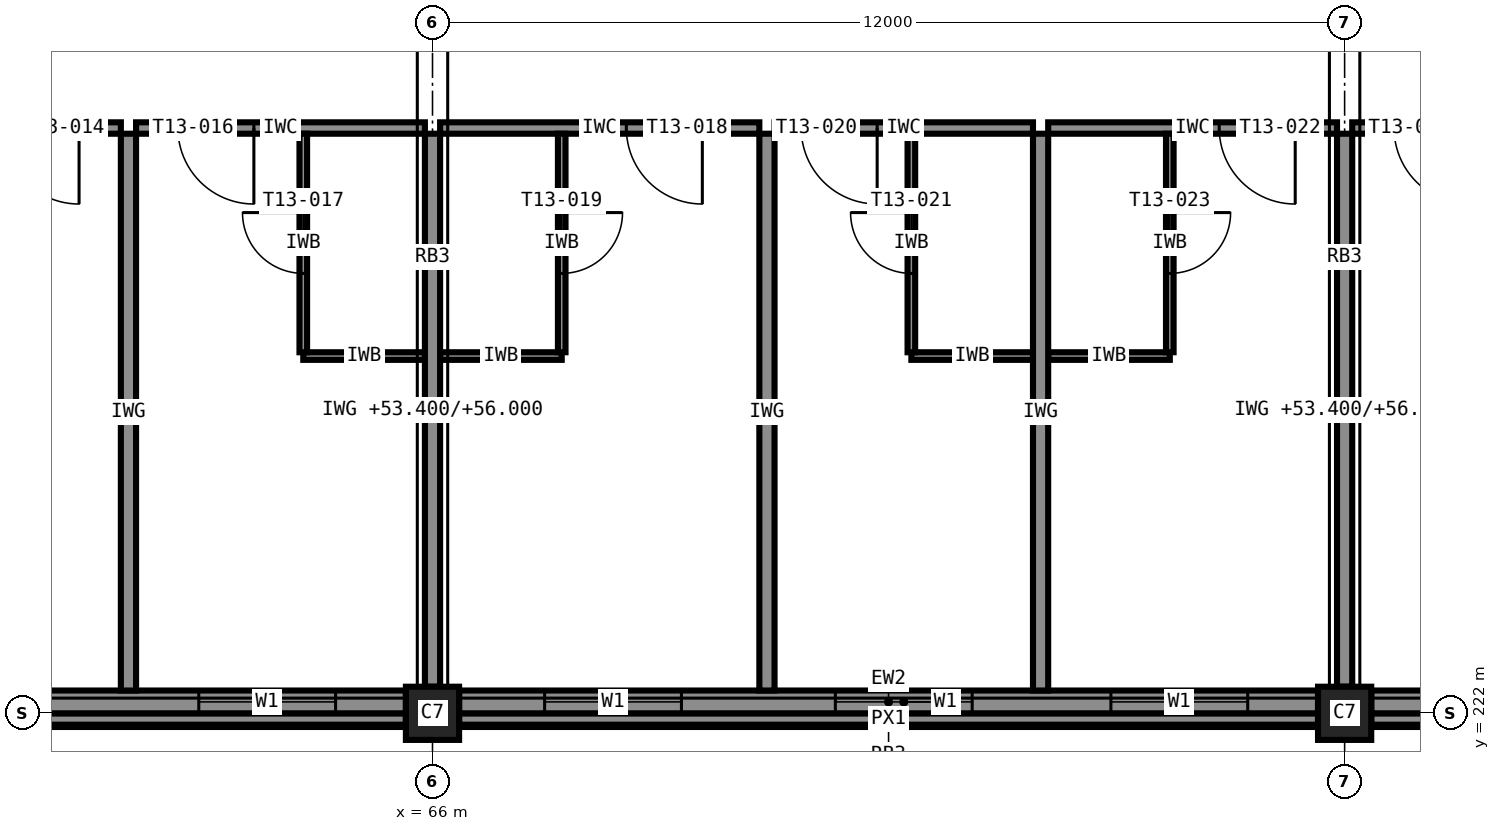
"""IFC4 building model, lengths in metres.
Left out: names, types, materials, properties, quantities, classifications, styles, units other than length and angle.
Written with IfcOpenShell. Run it as: python <this file> out.ifc"""

import sys

from ifc_helpers import new_model, si_unit, direction, frame, frame_2d, origin, origin_2d, place, context, subcontext, project, spatial, rectangle, extrude, element, fill, save


model = new_model("IFC4")
c1 = context("Model", 3, precision=1e-05, world=origin(), true_north=direction((0.0, 1.0)))
c2 = subcontext(c1, "Body", "Model", "MODEL_VIEW")
j1 = project(units=[si_unit("LENGTHUNIT", "METRE"), si_unit("PLANEANGLEUNIT", "RADIAN")], contexts=[c1])
p1 = place(None, origin())
s1 = spatial("IfcSite", under=j1, at=p1, CompositionType="ELEMENT")
p2 = place(p1, origin())
s2 = spatial("IfcBuilding", under=s1, at=p2, CompositionType="ELEMENT")
p3 = place(p2, frame((0.0, 0.0, 53.4)))
s3 = spatial("IfcBuildingStorey", under=s2, at=p3, CompositionType="ELEMENT", Elevation=53.4)
for number, where, z_axis, x_axis in (
    (1, (66.0, 222.0, 0.0), (0.0, 0.0, 1.0), (1.0, 0.0, 0.0)),
    (2, (78.0, 222.0, 0.0), (0.0, 0.0, 1.0), (1.0, 0.0, 0.0)),
):
    element("IfcColumn", number, at=place(p3, frame(where, z_axis=z_axis, x_axis=x_axis)), inside=s3, PredefinedType="COLUMN", context=c2, shape_type="SweptSolid", body=[
        extrude(rectangle(XDim=0.7, YDim=0.7, at=origin_2d()), origin(), (0.0, 0.0, 1.0), 3.6),
    ])
p4 = place(p3, frame((54.35, 222.15, 0.0), z_axis=(0.0, 0.0, 1.0), x_axis=(1.0, 0.0, 0.0)))
e3 = element("IfcWall", 3, at=p4, inside=s3, PredefinedType="STANDARD", context=c2, shape_type="SweptSolid", body=[
    extrude(rectangle(XDim=11.3, YDim=0.3, at=frame_2d((5.65, 0.0))), origin(), (0.0, 0.0, 1.0), 2.6),
])
p5 = place(p4, frame((0.925, 0.0, 0.85)))
e4 = element("IfcOpeningElement", 4, at=p5, cuts=e3, PredefinedType="OPENING", context=c2, shape_type="SweptSolid", body=[
    extrude(rectangle(XDim=1.8, YDim=1.75, at=frame_2d((0.9, 0.875))), frame((0.0, 0.16, 0.0), z_axis=(0.0, -1.0, 0.0), x_axis=(1.0, 0.0, 0.0)), (0.0, 0.0, 1.0), 0.32),
])
p6 = place(p4, frame((4.75, 0.0, 0.85)))
e5 = element("IfcOpeningElement", 5, at=p6, cuts=e3, PredefinedType="OPENING", context=c2, shape_type="SweptSolid", body=[
    extrude(rectangle(XDim=1.8, YDim=1.75, at=frame_2d((0.9, 0.875))), frame((0.0, 0.16, 0.0), z_axis=(0.0, -1.0, 0.0), x_axis=(1.0, 0.0, 0.0)), (0.0, 0.0, 1.0), 0.32),
])
p7 = place(p4, frame((8.575, 0.0, 0.85)))
e6 = element("IfcOpeningElement", 6, at=p7, cuts=e3, PredefinedType="OPENING", context=c2, shape_type="SweptSolid", body=[
    extrude(rectangle(XDim=1.8, YDim=1.75, at=frame_2d((0.9, 0.875))), frame((0.0, 0.16, 0.0), z_axis=(0.0, -1.0, 0.0), x_axis=(1.0, 0.0, 0.0)), (0.0, 0.0, 1.0), 0.32),
])
p8 = place(p3, frame((66.35, 222.15, 0.0), z_axis=(0.0, 0.0, 1.0), x_axis=(1.0, 0.0, 0.0)))
e7 = element("IfcWall", 7, at=p8, inside=s3, PredefinedType="STANDARD", context=c2, shape_type="SweptSolid", body=[
    extrude(rectangle(XDim=11.3, YDim=0.3, at=frame_2d((5.65, 0.0))), origin(), (0.0, 0.0, 1.0), 2.6),
])
p9 = place(p8, frame((1.125, 0.0, 0.85)))
e8 = element("IfcOpeningElement", 8, at=p9, cuts=e7, PredefinedType="OPENING", context=c2, shape_type="SweptSolid", body=[
    extrude(rectangle(XDim=1.8, YDim=1.75, at=frame_2d((0.9, 0.875))), frame((0.0, 0.16, 0.0), z_axis=(0.0, -1.0, 0.0), x_axis=(1.0, 0.0, 0.0)), (0.0, 0.0, 1.0), 0.32),
])
p10 = place(p8, frame((4.95, 0.0, 0.85)))
e9 = element("IfcOpeningElement", 9, at=p10, cuts=e7, PredefinedType="OPENING", context=c2, shape_type="SweptSolid", body=[
    extrude(rectangle(XDim=1.8, YDim=1.75, at=frame_2d((0.9, 0.875))), frame((0.0, 0.16, 0.0), z_axis=(0.0, -1.0, 0.0), x_axis=(1.0, 0.0, 0.0)), (0.0, 0.0, 1.0), 0.32),
])
p11 = place(p8, frame((8.575, 0.0, 0.85)))
e10 = element("IfcOpeningElement", 10, at=p11, cuts=e7, PredefinedType="OPENING", context=c2, shape_type="SweptSolid", body=[
    extrude(rectangle(XDim=1.8, YDim=1.75, at=frame_2d((0.9, 0.875))), frame((0.0, 0.16, 0.0), z_axis=(0.0, -1.0, 0.0), x_axis=(1.0, 0.0, 0.0)), (0.0, 0.0, 1.0), 0.32),
])
p12 = place(p3, frame((78.35, 222.15, 0.0), z_axis=(0.0, 0.0, 1.0), x_axis=(1.0, 0.0, 0.0)))
e11 = element("IfcWall", 11, at=p12, inside=s3, PredefinedType="STANDARD", context=c2, shape_type="SweptSolid", body=[
    extrude(rectangle(XDim=11.3, YDim=0.3, at=frame_2d((5.65, 0.0))), origin(), (0.0, 0.0, 1.0), 2.6),
])
p13 = place(p12, frame((0.925, 0.0, 0.85)))
e12 = element("IfcOpeningElement", 12, at=p13, cuts=e11, PredefinedType="OPENING", context=c2, shape_type="SweptSolid", body=[
    extrude(rectangle(XDim=1.8, YDim=1.75, at=frame_2d((0.9, 0.875))), frame((0.0, 0.16, 0.0), z_axis=(0.0, -1.0, 0.0), x_axis=(1.0, 0.0, 0.0)), (0.0, 0.0, 1.0), 0.32),
])
p14 = place(p12, frame((4.75, 0.0, 0.85)))
e13 = element("IfcOpeningElement", 13, at=p14, cuts=e11, PredefinedType="OPENING", context=c2, shape_type="SweptSolid", body=[
    extrude(rectangle(XDim=1.8, YDim=1.75, at=frame_2d((0.9, 0.875))), frame((0.0, 0.16, 0.0), z_axis=(0.0, -1.0, 0.0), x_axis=(1.0, 0.0, 0.0)), (0.0, 0.0, 1.0), 0.32),
])
for number, where, z_axis, x_axis in (
    (14, (54.35, 221.925, 3.4), (0.0, 0.0, 1.0), (1.0, 0.0, 0.0)),
    (15, (66.35, 221.925, 3.4), (0.0, 0.0, 1.0), (1.0, 0.0, 0.0)),
    (16, (78.35, 221.925, 3.4), (0.0, 0.0, 1.0), (1.0, 0.0, 0.0)),
):
    element("IfcWall", number, at=place(p3, frame(where, z_axis=z_axis, x_axis=x_axis)), inside=s3, PredefinedType="STANDARD", context=c2, shape_type="SweptSolid", body=[
        extrude(rectangle(XDim=11.3, YDim=0.15, at=frame_2d((5.65, 0.0))), origin(), (0.0, 0.0, 1.0), 0.2),
    ])
p15 = place(p3, frame((61.9, 229.7, 0.0), z_axis=(0.0, 0.0, 1.0), x_axis=(-1.0, 0.0, 0.0)))
e17 = element("IfcWall", 17, at=p15, inside=s3, PredefinedType="PARTITIONING", context=c2, shape_type="SweptSolid", body=[
    extrude(rectangle(XDim=3.8, YDim=0.15, at=frame_2d((1.9, 0.0))), origin(), (0.0, 0.0, 1.0), 3.4),
])
p16 = place(p15, frame((0.55, 0.0, 0.0)))
e18 = element("IfcOpeningElement", 18, at=p16, cuts=e17, PredefinedType="OPENING", context=c2, shape_type="SweptSolid", body=[
    extrude(rectangle(XDim=1.0, YDim=2.1, at=frame_2d((0.5, 1.05))), frame((0.0, 0.085, 0.0), z_axis=(0.0, -1.0, 0.0), x_axis=(1.0, 0.0, 0.0)), (0.0, 0.0, 1.0), 0.17),
])
p17 = place(p3, frame((65.9, 229.7, 0.0), z_axis=(0.0, 0.0, 1.0), x_axis=(-1.0, 0.0, 0.0)))
e19 = element("IfcWall", 19, at=p17, inside=s3, PredefinedType="PARTITIONING", context=c2, shape_type="SweptSolid", body=[
    extrude(rectangle(XDim=3.8, YDim=0.15, at=frame_2d((1.9, 0.0))), origin(), (0.0, 0.0, 1.0), 3.4),
])
p18 = place(p17, frame((2.25, 0.0, 0.0)))
e20 = element("IfcOpeningElement", 20, at=p18, cuts=e19, PredefinedType="OPENING", context=c2, shape_type="SweptSolid", body=[
    extrude(rectangle(XDim=1.0, YDim=2.1, at=frame_2d((0.5, 1.05))), frame((0.0, 0.085, 0.0), z_axis=(0.0, -1.0, 0.0), x_axis=(1.0, 0.0, 0.0)), (0.0, 0.0, 1.0), 0.17),
])
p19 = place(p3, frame((64.3, 226.7, 0.0), z_axis=(0.0, 0.0, 1.0), x_axis=(1.0, 0.0, 0.0)))
e21 = element("IfcWall", 21, at=p19, inside=s3, PredefinedType="PARTITIONING", context=c2, shape_type="SweptSolid", body=[
    extrude(rectangle(XDim=1.6, YDim=0.1, at=frame_2d((0.8, 0.0))), origin(), (0.0, 0.0, 1.0), 3.4),
])
p20 = place(p3, frame((64.3, 226.75, 0.0), z_axis=(0.0, 0.0, 1.0), x_axis=(0.0, 1.0, 0.0)))
e22 = element("IfcWall", 22, at=p20, inside=s3, PredefinedType="PARTITIONING", context=c2, shape_type="SweptSolid", body=[
    extrude(rectangle(XDim=2.875, YDim=0.1, at=frame_2d((1.438, 0.0))), origin(), (0.0, 0.0, 1.0), 3.4),
])
p21 = place(p20, frame((1.038, 0.0, 0.0)))
e23 = element("IfcOpeningElement", 23, at=p21, cuts=e22, PredefinedType="OPENING", context=c2, shape_type="SweptSolid", body=[
    extrude(rectangle(XDim=0.8, YDim=2.1, at=frame_2d((0.4, 1.05))), frame((0.0, 0.06, 0.0), z_axis=(0.0, -1.0, 0.0), x_axis=(1.0, 0.0, 0.0)), (0.0, 0.0, 1.0), 0.12),
])
p22 = place(p3, frame((70.3, 229.7, 0.0), z_axis=(0.0, 0.0, 1.0), x_axis=(-1.0, 0.0, 0.0)))
e24 = element("IfcWall", 24, at=p22, inside=s3, PredefinedType="PARTITIONING", context=c2, shape_type="SweptSolid", body=[
    extrude(rectangle(XDim=4.2, YDim=0.15, at=frame_2d((2.1, 0.0))), origin(), (0.0, 0.0, 1.0), 3.4),
])
p23 = place(p22, frame((0.75, 0.0, 0.0)))
e25 = element("IfcOpeningElement", 25, at=p23, cuts=e24, PredefinedType="OPENING", context=c2, shape_type="SweptSolid", body=[
    extrude(rectangle(XDim=1.0, YDim=2.1, at=frame_2d((0.5, 1.05))), frame((0.0, 0.085, 0.0), z_axis=(0.0, -1.0, 0.0), x_axis=(1.0, 0.0, 0.0)), (0.0, 0.0, 1.0), 0.17),
])
p24 = place(p3, frame((66.1, 226.7, 0.0), z_axis=(0.0, 0.0, 1.0), x_axis=(1.0, 0.0, 0.0)))
e26 = element("IfcWall", 26, at=p24, inside=s3, PredefinedType="PARTITIONING", context=c2, shape_type="SweptSolid", body=[
    extrude(rectangle(XDim=1.6, YDim=0.1, at=frame_2d((0.8, 0.0))), origin(), (0.0, 0.0, 1.0), 3.4),
])
p25 = place(p3, frame((67.7, 229.625, 0.0), z_axis=(0.0, 0.0, 1.0), x_axis=(0.0, -1.0, 0.0)))
e27 = element("IfcWall", 27, at=p25, inside=s3, PredefinedType="PARTITIONING", context=c2, shape_type="SweptSolid", body=[
    extrude(rectangle(XDim=2.875, YDim=0.1, at=frame_2d((1.438, 0.0))), origin(), (0.0, 0.0, 1.0), 3.4),
])
p26 = place(p25, frame((1.038, 0.0, 0.0)))
e28 = element("IfcOpeningElement", 28, at=p26, cuts=e27, PredefinedType="OPENING", context=c2, shape_type="SweptSolid", body=[
    extrude(rectangle(XDim=0.8, YDim=2.1, at=frame_2d((0.4, 1.05))), frame((0.0, 0.06, 0.0), z_axis=(0.0, -1.0, 0.0), x_axis=(1.0, 0.0, 0.0)), (0.0, 0.0, 1.0), 0.12),
])
p27 = place(p3, frame((73.9, 229.7, 0.0), z_axis=(0.0, 0.0, 1.0), x_axis=(-1.0, 0.0, 0.0)))
e29 = element("IfcWall", 29, at=p27, inside=s3, PredefinedType="PARTITIONING", context=c2, shape_type="SweptSolid", body=[
    extrude(rectangle(XDim=3.4, YDim=0.15, at=frame_2d((1.7, 0.0))), origin(), (0.0, 0.0, 1.0), 3.4),
])
p28 = place(p27, frame((2.05, 0.0, 0.0)))
e30 = element("IfcOpeningElement", 30, at=p28, cuts=e29, PredefinedType="OPENING", context=c2, shape_type="SweptSolid", body=[
    extrude(rectangle(XDim=1.0, YDim=2.1, at=frame_2d((0.5, 1.05))), frame((0.0, 0.085, 0.0), z_axis=(0.0, -1.0, 0.0), x_axis=(1.0, 0.0, 0.0)), (0.0, 0.0, 1.0), 0.17),
])
p29 = place(p3, frame((72.3, 226.7, 0.0), z_axis=(0.0, 0.0, 1.0), x_axis=(1.0, 0.0, 0.0)))
e31 = element("IfcWall", 31, at=p29, inside=s3, PredefinedType="PARTITIONING", context=c2, shape_type="SweptSolid", body=[
    extrude(rectangle(XDim=1.6, YDim=0.1, at=frame_2d((0.8, 0.0))), origin(), (0.0, 0.0, 1.0), 3.4),
])
p30 = place(p3, frame((72.3, 226.75, 0.0), z_axis=(0.0, 0.0, 1.0), x_axis=(0.0, 1.0, 0.0)))
e32 = element("IfcWall", 32, at=p30, inside=s3, PredefinedType="PARTITIONING", context=c2, shape_type="SweptSolid", body=[
    extrude(rectangle(XDim=2.875, YDim=0.1, at=frame_2d((1.438, 0.0))), origin(), (0.0, 0.0, 1.0), 3.4),
])
p31 = place(p30, frame((1.038, 0.0, 0.0)))
e33 = element("IfcOpeningElement", 33, at=p31, cuts=e32, PredefinedType="OPENING", context=c2, shape_type="SweptSolid", body=[
    extrude(rectangle(XDim=0.8, YDim=2.1, at=frame_2d((0.4, 1.05))), frame((0.0, 0.06, 0.0), z_axis=(0.0, -1.0, 0.0), x_axis=(1.0, 0.0, 0.0)), (0.0, 0.0, 1.0), 0.12),
])
p32 = place(p3, frame((77.9, 229.7, 0.0), z_axis=(0.0, 0.0, 1.0), x_axis=(-1.0, 0.0, 0.0)))
e34 = element("IfcWall", 34, at=p32, inside=s3, PredefinedType="PARTITIONING", context=c2, shape_type="SweptSolid", body=[
    extrude(rectangle(XDim=3.8, YDim=0.15, at=frame_2d((1.9, 0.0))), origin(), (0.0, 0.0, 1.0), 3.4),
])
p33 = place(p32, frame((0.55, 0.0, 0.0)))
e35 = element("IfcOpeningElement", 35, at=p33, cuts=e34, PredefinedType="OPENING", context=c2, shape_type="SweptSolid", body=[
    extrude(rectangle(XDim=1.0, YDim=2.1, at=frame_2d((0.5, 1.05))), frame((0.0, 0.085, 0.0), z_axis=(0.0, -1.0, 0.0), x_axis=(1.0, 0.0, 0.0)), (0.0, 0.0, 1.0), 0.17),
])
p34 = place(p3, frame((74.1, 226.7, 0.0), z_axis=(0.0, 0.0, 1.0), x_axis=(1.0, 0.0, 0.0)))
e36 = element("IfcWall", 36, at=p34, inside=s3, PredefinedType="PARTITIONING", context=c2, shape_type="SweptSolid", body=[
    extrude(rectangle(XDim=1.6, YDim=0.1, at=frame_2d((0.8, 0.0))), origin(), (0.0, 0.0, 1.0), 3.4),
])
p35 = place(p3, frame((75.7, 229.625, 0.0), z_axis=(0.0, 0.0, 1.0), x_axis=(0.0, -1.0, 0.0)))
e37 = element("IfcWall", 37, at=p35, inside=s3, PredefinedType="PARTITIONING", context=c2, shape_type="SweptSolid", body=[
    extrude(rectangle(XDim=2.875, YDim=0.1, at=frame_2d((1.438, 0.0))), origin(), (0.0, 0.0, 1.0), 3.4),
])
p36 = place(p35, frame((1.038, 0.0, 0.0)))
e38 = element("IfcOpeningElement", 38, at=p36, cuts=e37, PredefinedType="OPENING", context=c2, shape_type="SweptSolid", body=[
    extrude(rectangle(XDim=0.8, YDim=2.1, at=frame_2d((0.4, 1.05))), frame((0.0, 0.06, 0.0), z_axis=(0.0, -1.0, 0.0), x_axis=(1.0, 0.0, 0.0)), (0.0, 0.0, 1.0), 0.12),
])
p37 = place(p3, frame((81.9, 229.7, 0.0), z_axis=(0.0, 0.0, 1.0), x_axis=(-1.0, 0.0, 0.0)))
e39 = element("IfcWall", 39, at=p37, inside=s3, PredefinedType="PARTITIONING", context=c2, shape_type="SweptSolid", body=[
    extrude(rectangle(XDim=3.8, YDim=0.15, at=frame_2d((1.9, 0.0))), origin(), (0.0, 0.0, 1.0), 3.4),
])
p38 = place(p37, frame((2.25, 0.0, 0.0)))
e40 = element("IfcOpeningElement", 40, at=p38, cuts=e39, PredefinedType="OPENING", context=c2, shape_type="SweptSolid", body=[
    extrude(rectangle(XDim=1.0, YDim=2.1, at=frame_2d((0.5, 1.05))), frame((0.0, 0.085, 0.0), z_axis=(0.0, -1.0, 0.0), x_axis=(1.0, 0.0, 0.0)), (0.0, 0.0, 1.0), 0.17),
])
p39 = place(p3, frame((62.0, 222.3, 0.0), z_axis=(0.0, 0.0, 1.0), x_axis=(0.0, 1.0, 0.0)))
e41 = element("IfcWall", 41, at=p39, inside=s3, PredefinedType="PARTITIONING", context=c2, shape_type="SweptSolid", body=[
    extrude(rectangle(XDim=7.325, YDim=0.2, at=frame_2d((3.663, 0.0))), origin(), (0.0, 0.0, 1.0), 3.4),
])
p40 = place(p3, frame((66.0, 222.35, 0.0), z_axis=(0.0, 0.0, 1.0), x_axis=(0.0, 1.0, 0.0)))
e42 = element("IfcWall", 42, at=p40, inside=s3, PredefinedType="PARTITIONING", context=c2, shape_type="SweptSolid", body=[
    extrude(rectangle(XDim=7.275, YDim=0.2, at=frame_2d((3.637, 0.0))), origin(), (0.0, 0.0, 1.0), 2.6),
])
for number, where, z_axis, x_axis in (
    (43, (70.4, 222.3, 0.0), (0.0, 0.0, 1.0), (0.0, 1.0, 0.0)),
    (44, (74.0, 222.3, 0.0), (0.0, 0.0, 1.0), (0.0, 1.0, 0.0)),
):
    element("IfcWall", number, at=place(p3, frame(where, z_axis=z_axis, x_axis=x_axis)), inside=s3, PredefinedType="PARTITIONING", context=c2, shape_type="SweptSolid", body=[
        extrude(rectangle(XDim=7.325, YDim=0.2, at=frame_2d((3.663, 0.0))), origin(), (0.0, 0.0, 1.0), 3.4),
    ])
p41 = place(p3, frame((78.0, 222.35, 0.0), z_axis=(0.0, 0.0, 1.0), x_axis=(0.0, 1.0, 0.0)))
e45 = element("IfcWall", 45, at=p41, inside=s3, PredefinedType="PARTITIONING", context=c2, shape_type="SweptSolid", body=[
    extrude(rectangle(XDim=7.275, YDim=0.2, at=frame_2d((3.637, 0.0))), origin(), (0.0, 0.0, 1.0), 2.6),
])
p42 = place(p7, origin())
e46 = element("IfcWindow", 46, at=p42, inside=s3, PartitioningType="SINGLE_PANEL", PredefinedType="WINDOW", context=c2, shape_type="SweptSolid", body=[
    extrude(rectangle(XDim=1.8, YDim=1.75, at=frame_2d((0.9, 0.875))), frame((0.0, 0.03, 0.0), z_axis=(0.0, -1.0, 0.0), x_axis=(1.0, 0.0, 0.0)), (0.0, 0.0, 1.0), 0.06),
])
fill(e6, e46)
p43 = place(p9, origin())
e47 = element("IfcWindow", 47, at=p43, inside=s3, PartitioningType="SINGLE_PANEL", PredefinedType="WINDOW", context=c2, shape_type="SweptSolid", body=[
    extrude(rectangle(XDim=1.8, YDim=1.75, at=frame_2d((0.9, 0.875))), frame((0.0, 0.03, 0.0), z_axis=(0.0, -1.0, 0.0), x_axis=(1.0, 0.0, 0.0)), (0.0, 0.0, 1.0), 0.06),
])
fill(e8, e47)
p44 = place(p10, origin())
e48 = element("IfcWindow", 48, at=p44, inside=s3, PartitioningType="SINGLE_PANEL", PredefinedType="WINDOW", context=c2, shape_type="SweptSolid", body=[
    extrude(rectangle(XDim=1.8, YDim=1.75, at=frame_2d((0.9, 0.875))), frame((0.0, 0.03, 0.0), z_axis=(0.0, -1.0, 0.0), x_axis=(1.0, 0.0, 0.0)), (0.0, 0.0, 1.0), 0.06),
])
fill(e9, e48)
p45 = place(p11, origin())
e49 = element("IfcWindow", 49, at=p45, inside=s3, PartitioningType="SINGLE_PANEL", PredefinedType="WINDOW", context=c2, shape_type="SweptSolid", body=[
    extrude(rectangle(XDim=1.8, YDim=1.75, at=frame_2d((0.9, 0.875))), frame((0.0, 0.03, 0.0), z_axis=(0.0, -1.0, 0.0), x_axis=(1.0, 0.0, 0.0)), (0.0, 0.0, 1.0), 0.06),
])
fill(e10, e49)
p46 = place(p16, origin())
e50 = element("IfcDoor", 50, at=p46, inside=s3, OperationType="SINGLE_SWING_LEFT", PredefinedType="DOOR", context=c2, shape_type="SweptSolid", body=[
    extrude(rectangle(XDim=1.0, YDim=2.1, at=frame_2d((0.5, 1.05))), frame((0.0, 0.025, 0.0), z_axis=(0.0, -1.0, 0.0), x_axis=(1.0, 0.0, 0.0)), (0.0, 0.0, 1.0), 0.05),
])
fill(e18, e50)
p47 = place(p18, origin())
e51 = element("IfcDoor", 51, at=p47, inside=s3, OperationType="SINGLE_SWING_LEFT", PredefinedType="DOOR", context=c2, shape_type="SweptSolid", body=[
    extrude(rectangle(XDim=1.0, YDim=2.1, at=frame_2d((0.5, 1.05))), frame((0.0, 0.025, 0.0), z_axis=(0.0, -1.0, 0.0), x_axis=(1.0, 0.0, 0.0)), (0.0, 0.0, 1.0), 0.05),
])
fill(e20, e51)
p48 = place(p21, origin())
e52 = element("IfcDoor", 52, at=p48, inside=s3, OperationType="SINGLE_SWING_RIGHT", PredefinedType="DOOR", context=c2, shape_type="SweptSolid", body=[
    extrude(rectangle(XDim=0.8, YDim=2.1, at=frame_2d((0.4, 1.05))), frame((0.0, 0.025, 0.0), z_axis=(0.0, -1.0, 0.0), x_axis=(1.0, 0.0, 0.0)), (0.0, 0.0, 1.0), 0.05),
])
fill(e23, e52)
p49 = place(p23, origin())
e53 = element("IfcDoor", 53, at=p49, inside=s3, OperationType="SINGLE_SWING_LEFT", PredefinedType="DOOR", context=c2, shape_type="SweptSolid", body=[
    extrude(rectangle(XDim=1.0, YDim=2.1, at=frame_2d((0.5, 1.05))), frame((0.0, 0.025, 0.0), z_axis=(0.0, -1.0, 0.0), x_axis=(1.0, 0.0, 0.0)), (0.0, 0.0, 1.0), 0.05),
])
fill(e25, e53)
p50 = place(p26, origin())
e54 = element("IfcDoor", 54, at=p50, inside=s3, OperationType="SINGLE_SWING_LEFT", PredefinedType="DOOR", context=c2, shape_type="SweptSolid", body=[
    extrude(rectangle(XDim=0.8, YDim=2.1, at=frame_2d((0.4, 1.05))), frame((0.0, 0.025, 0.0), z_axis=(0.0, -1.0, 0.0), x_axis=(1.0, 0.0, 0.0)), (0.0, 0.0, 1.0), 0.05),
])
fill(e28, e54)
p51 = place(p28, origin())
e55 = element("IfcDoor", 55, at=p51, inside=s3, OperationType="SINGLE_SWING_LEFT", PredefinedType="DOOR", context=c2, shape_type="SweptSolid", body=[
    extrude(rectangle(XDim=1.0, YDim=2.1, at=frame_2d((0.5, 1.05))), frame((0.0, 0.025, 0.0), z_axis=(0.0, -1.0, 0.0), x_axis=(1.0, 0.0, 0.0)), (0.0, 0.0, 1.0), 0.05),
])
fill(e30, e55)
p52 = place(p31, origin())
e56 = element("IfcDoor", 56, at=p52, inside=s3, OperationType="SINGLE_SWING_RIGHT", PredefinedType="DOOR", context=c2, shape_type="SweptSolid", body=[
    extrude(rectangle(XDim=0.8, YDim=2.1, at=frame_2d((0.4, 1.05))), frame((0.0, 0.025, 0.0), z_axis=(0.0, -1.0, 0.0), x_axis=(1.0, 0.0, 0.0)), (0.0, 0.0, 1.0), 0.05),
])
fill(e33, e56)
p53 = place(p33, origin())
e57 = element("IfcDoor", 57, at=p53, inside=s3, OperationType="SINGLE_SWING_LEFT", PredefinedType="DOOR", context=c2, shape_type="SweptSolid", body=[
    extrude(rectangle(XDim=1.0, YDim=2.1, at=frame_2d((0.5, 1.05))), frame((0.0, 0.025, 0.0), z_axis=(0.0, -1.0, 0.0), x_axis=(1.0, 0.0, 0.0)), (0.0, 0.0, 1.0), 0.05),
])
fill(e35, e57)
p54 = place(p36, origin())
e58 = element("IfcDoor", 58, at=p54, inside=s3, OperationType="SINGLE_SWING_LEFT", PredefinedType="DOOR", context=c2, shape_type="SweptSolid", body=[
    extrude(rectangle(XDim=0.8, YDim=2.1, at=frame_2d((0.4, 1.05))), frame((0.0, 0.025, 0.0), z_axis=(0.0, -1.0, 0.0), x_axis=(1.0, 0.0, 0.0)), (0.0, 0.0, 1.0), 0.05),
])
fill(e38, e58)
p55 = place(p38, origin())
e59 = element("IfcDoor", 59, at=p55, inside=s3, OperationType="SINGLE_SWING_LEFT", PredefinedType="DOOR", context=c2, shape_type="SweptSolid", body=[
    extrude(rectangle(XDim=1.0, YDim=2.1, at=frame_2d((0.5, 1.05))), frame((0.0, 0.025, 0.0), z_axis=(0.0, -1.0, 0.0), x_axis=(1.0, 0.0, 0.0)), (0.0, 0.0, 1.0), 0.05),
])
fill(e40, e59)
save(model, sys.argv[1])
